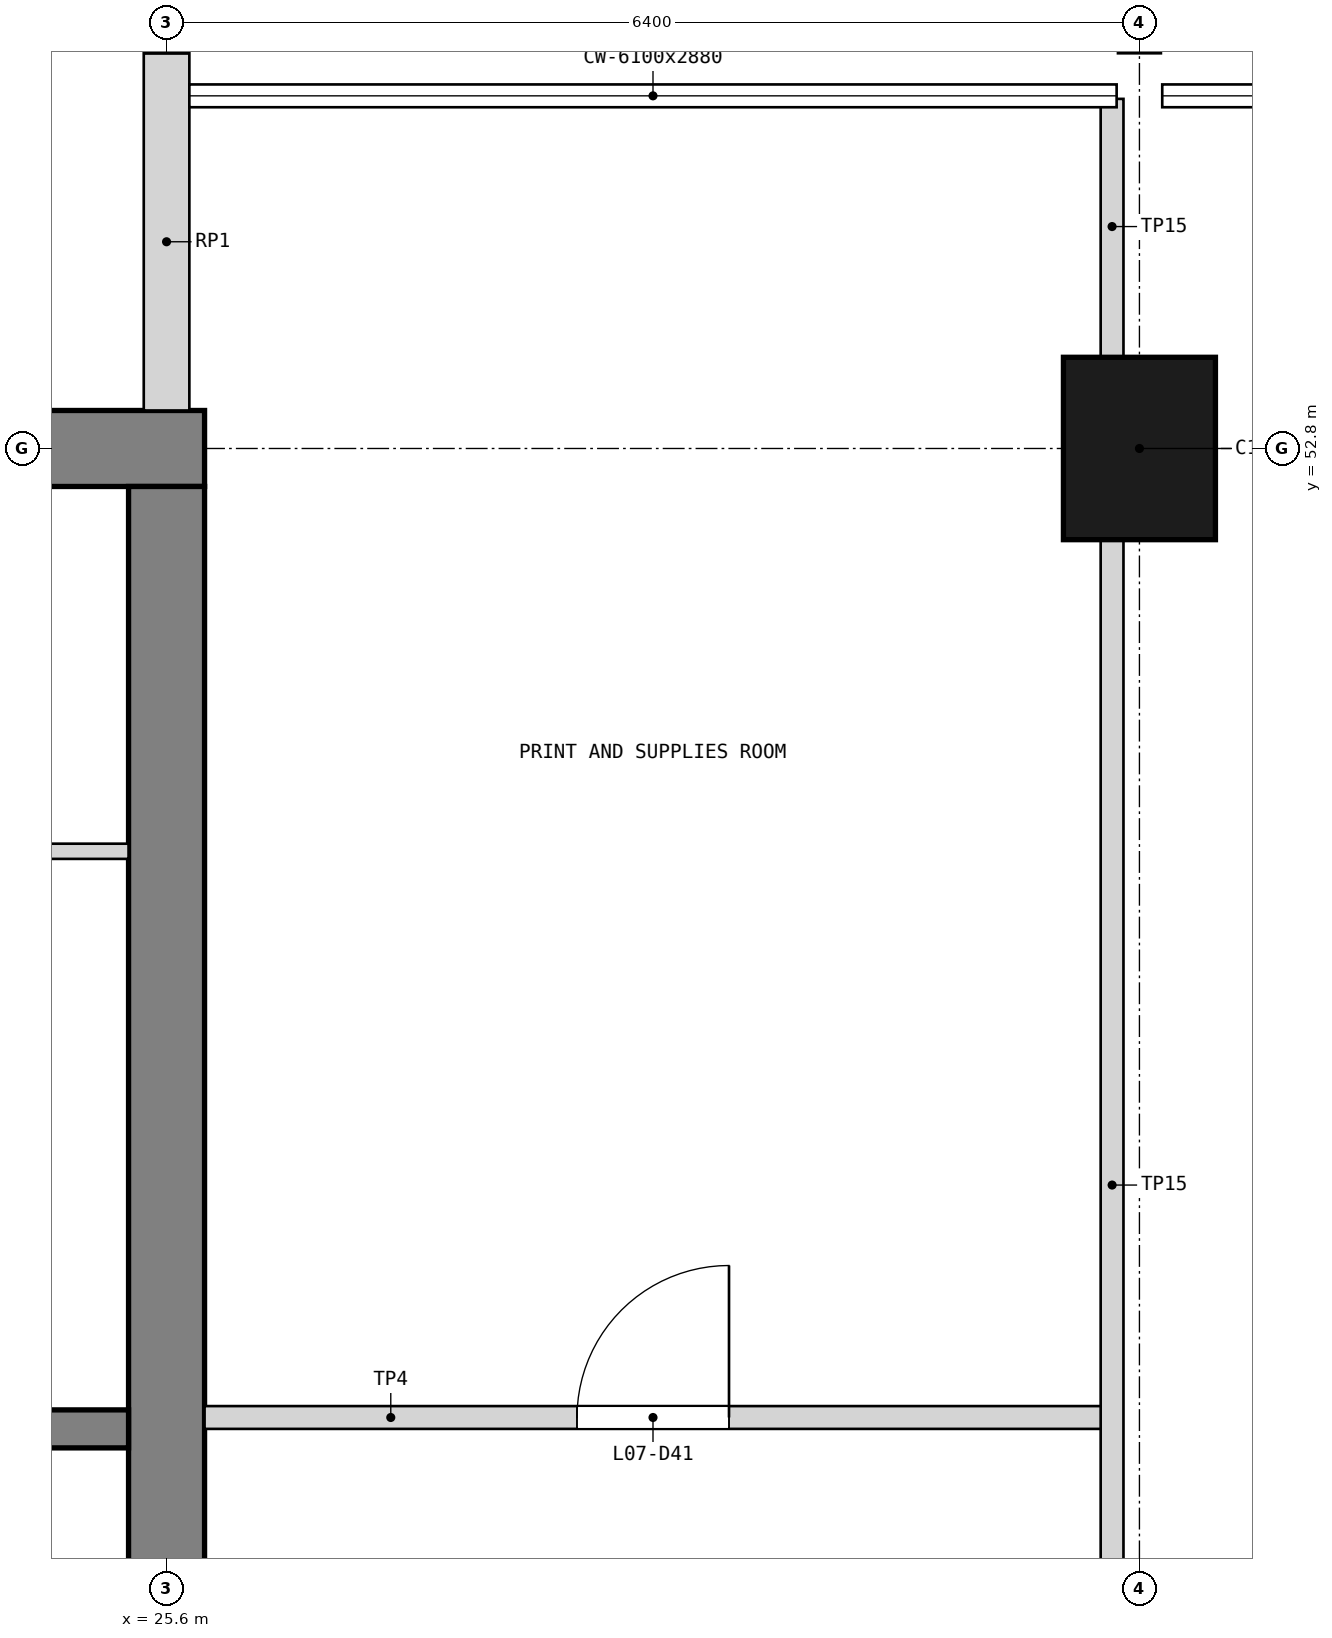
"""IFC4 building model, lengths in metres.
Left out: names, types, materials, properties, quantities, classifications, styles, units other than length and angle.
Written with IfcOpenShell. Run it as: python <this file> out.ifc"""

import sys

from ifc_helpers import new_model, si_unit, direction, frame, frame_2d, origin, origin_2d, place, context, subcontext, project, spatial, rectangle, extrude, element, fill, save


model = new_model("IFC4")
c1 = context("Model", 3, precision=1e-05, world=origin(), true_north=direction((0.0, 1.0)))
c2 = subcontext(c1, "Body", "Model", "MODEL_VIEW")
j1 = project(units=[si_unit("LENGTHUNIT", "METRE"), si_unit("PLANEANGLEUNIT", "RADIAN")], contexts=[c1])
p1 = place(None, origin())
s1 = spatial("IfcSite", under=j1, at=p1, CompositionType="ELEMENT")
p2 = place(p1, origin())
s2 = spatial("IfcBuilding", under=s1, at=p2, CompositionType="ELEMENT")
p3 = place(p2, frame((0.0, 0.0, 28.8)))
s3 = spatial("IfcBuildingStorey", under=s2, at=p3, CompositionType="ELEMENT", Elevation=28.8)
p4 = place(p3, frame((12.55, 52.8, 0.0), z_axis=(0.0, 0.0, 1.0), x_axis=(1.0, 0.0, 0.0)))
e1 = element("IfcWall", 1, at=p4, inside=s3, PredefinedType="SHEAR", context=c2, shape_type="SweptSolid", body=[
    extrude(rectangle(XDim=13.3, YDim=0.5, at=frame_2d((6.65, 0.0))), origin(), (0.0, 0.0, 1.0), 3.9),
])
p5 = place(p4, frame((1.85, 0.0, 1.0)))
e2 = element("IfcOpeningElement", 2, at=p5, cuts=e1, PredefinedType="OPENING", context=c2, shape_type="SweptSolid", body=[
    extrude(rectangle(XDim=0.4, YDim=2.0, at=frame_2d((0.2, 1.0))), frame((0.0, 0.26, 0.0), z_axis=(0.0, -1.0, 0.0), x_axis=(1.0, 0.0, 0.0)), (0.0, 0.0, 1.0), 0.52),
])
p6 = place(p3, frame((25.6, 33.85, 0.0), z_axis=(0.0, 0.0, 1.0), x_axis=(0.0, 1.0, 0.0)))
e3 = element("IfcWall", 3, at=p6, inside=s3, PredefinedType="SHEAR", context=c2, shape_type="SweptSolid", body=[
    extrude(rectangle(XDim=18.7, YDim=0.5, at=frame_2d((9.35, 0.0))), origin(), (0.0, 0.0, 1.0), 3.9),
])
p7 = place(p6, frame((8.35, 0.0, 0.0)))
e4 = element("IfcOpeningElement", 4, at=p7, cuts=e3, PredefinedType="OPENING", context=c2, shape_type="SweptSolid", body=[
    extrude(rectangle(XDim=2.0, YDim=2.1, at=frame_2d((1.0, 1.05))), frame((0.0, 0.26, 0.0), z_axis=(0.0, -1.0, 0.0), x_axis=(1.0, 0.0, 0.0)), (0.0, 0.0, 1.0), 0.52),
])
p8 = place(p3, frame((32.0, 52.8, 0.0), z_axis=(0.0, 0.0, 1.0), x_axis=(1.0, 0.0, 0.0)))
e5 = element("IfcColumn", 5, at=p8, inside=s3, PredefinedType="COLUMN", context=c2, shape_type="SweptSolid", body=[
    extrude(rectangle(XDim=1.0, YDim=1.2, at=origin_2d()), origin(), (0.0, 0.0, 1.0), 3.9),
])
p9 = place(p3, frame((25.6, 53.05, 0.0), z_axis=(0.0, 0.0, 1.0), x_axis=(0.0, 1.0, 0.0)))
e6 = element("IfcWall", 6, at=p9, inside=s3, PredefinedType="SOLIDWALL", context=c2, shape_type="SweptSolid", body=[
    extrude(rectangle(XDim=2.35, YDim=0.3, at=frame_2d((1.175, 0.0))), origin(), (0.0, 0.0, 1.0), 2.88),
])
p10 = place(p3, frame((19.875, 46.35, 0.0), z_axis=(0.0, 0.0, 1.0), x_axis=(1.0, 0.0, 0.0)))
e7 = element("IfcWall", 7, at=p10, inside=s3, PredefinedType="SOLIDWALL", context=c2, shape_type="SweptSolid", body=[
    extrude(rectangle(XDim=5.475, YDim=0.25, at=frame_2d((2.738, 0.0))), origin(), (0.0, 0.0, 1.0), 3.6),
])
p11 = place(p3, frame((20.125, 50.15, 0.0), z_axis=(0.0, 0.0, 1.0), x_axis=(1.0, 0.0, 0.0)))
e8 = element("IfcWall", 8, at=p11, inside=s3, PredefinedType="PARTITIONING", context=c2, shape_type="SweptSolid", body=[
    extrude(rectangle(XDim=5.225, YDim=0.1, at=frame_2d((2.613, 0.0))), origin(), (0.0, 0.0, 1.0), 3.6),
])
p12 = place(p3, frame((25.85, 46.425, 0.0), z_axis=(0.0, 0.0, 1.0), x_axis=(1.0, 0.0, 0.0)))
e9 = element("IfcWall", 9, at=p12, inside=s3, PredefinedType="PARTITIONING", context=c2, shape_type="SweptSolid", body=[
    extrude(rectangle(XDim=5.97, YDim=0.15, at=frame_2d((2.985, 0.0))), origin(), (0.0, 0.0, 1.0), 3.68),
])
p13 = place(p12, frame((2.45, 0.0, 0.0)))
e10 = element("IfcOpeningElement", 10, at=p13, cuts=e9, PredefinedType="OPENING", context=c2, shape_type="SweptSolid", body=[
    extrude(rectangle(XDim=1.0, YDim=2.1, at=frame_2d((0.5, 1.05))), frame((0.0, 0.085, 0.0), z_axis=(0.0, -1.0, 0.0), x_axis=(1.0, 0.0, 0.0)), (0.0, 0.0, 1.0), 0.17),
])
p14 = place(p3, frame((31.82, 43.646, 0.0), z_axis=(0.0, 0.0, 1.0), x_axis=(0.0, 1.0, 0.0)))
e11 = element("IfcWall", 11, at=p14, inside=s3, PredefinedType="PARTITIONING", context=c2, shape_type="SweptSolid", body=[
    extrude(rectangle(XDim=8.573, YDim=0.15, at=frame_2d((4.287, 0.0))), origin(), (0.0, 0.0, 1.0), 2.78),
])
p15 = place(p3, frame((31.82, 53.38, 0.0), z_axis=(0.0, 0.0, 1.0), x_axis=(0.0, 1.0, 0.0)))
e12 = element("IfcWall", 12, at=p15, inside=s3, PredefinedType="PARTITIONING", context=c2, shape_type="SweptSolid", body=[
    extrude(rectangle(XDim=1.72, YDim=0.15, at=frame_2d((0.86, 0.0))), origin(), (0.0, 0.0, 1.0), 2.78),
])
p16 = place(p13, origin())
e13 = element("IfcDoor", 13, at=p16, inside=s3, OperationType="SINGLE_SWING_RIGHT", PredefinedType="DOOR", context=c2, shape_type="SweptSolid", body=[
    extrude(rectangle(XDim=1.0, YDim=2.1, at=frame_2d((0.5, 1.05))), frame((0.0, 0.025, 0.0), z_axis=(0.0, -1.0, 0.0), x_axis=(1.0, 0.0, 0.0)), (0.0, 0.0, 1.0), 0.05),
])
fill(e10, e13)
save(model, sys.argv[1])
